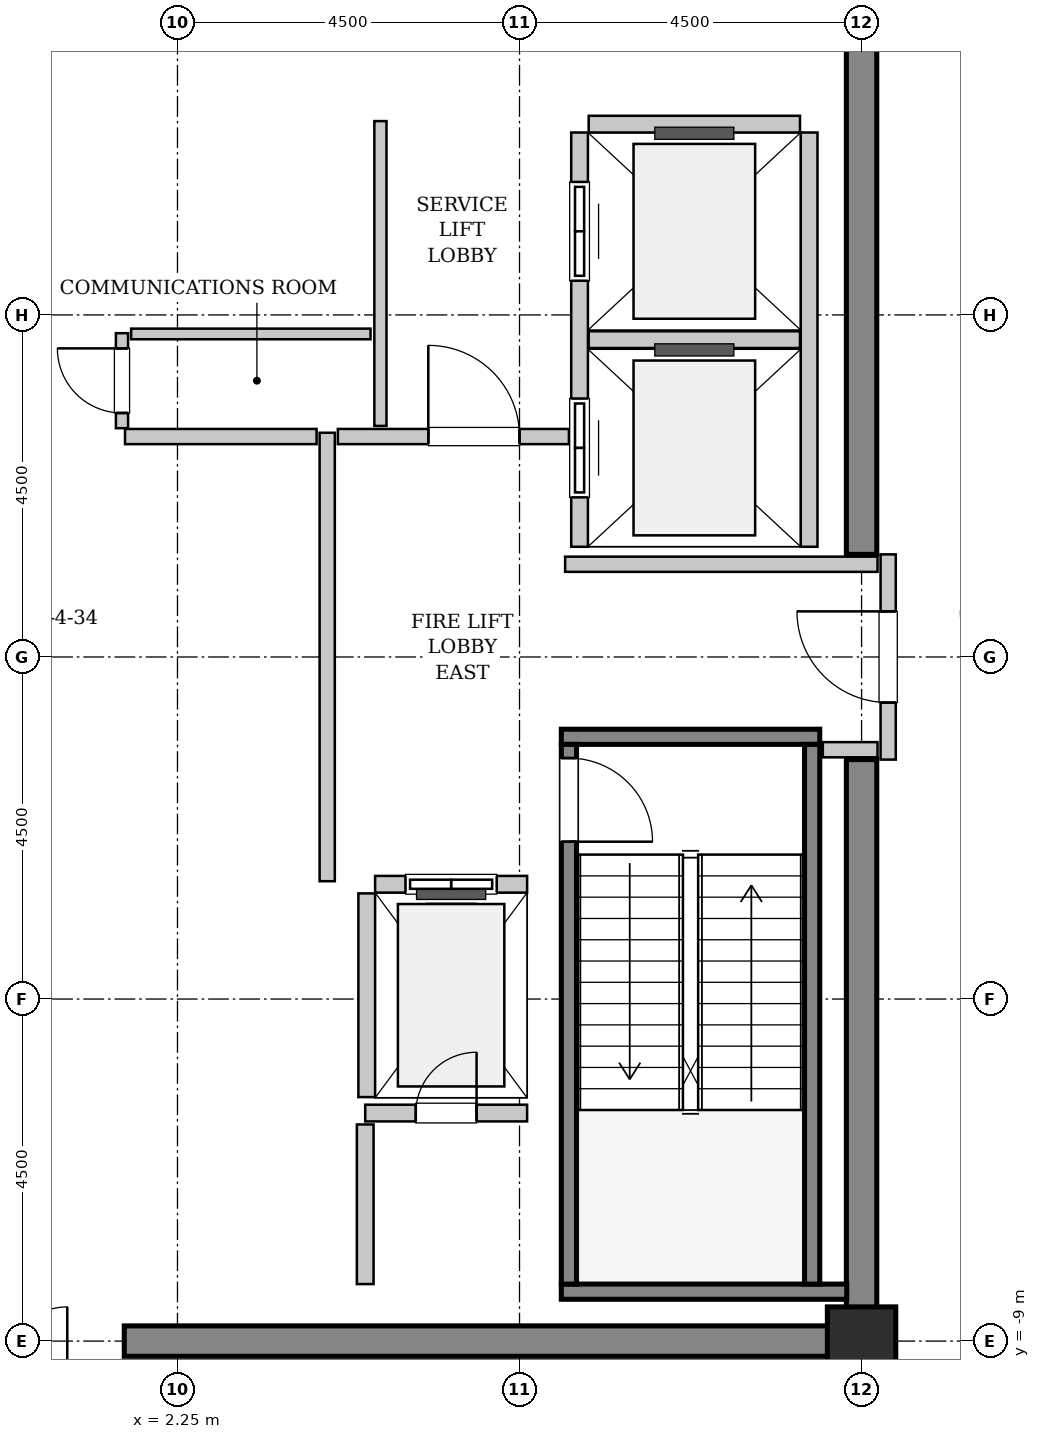
"""IFC4 building model, lengths in metres.
Left out: names, types, materials, properties, quantities, classifications, styles, units other than length and angle.
Written with IfcOpenShell. Run it as: python <this file> out.ifc"""

import sys

from ifc_helpers import new_model, si_unit, direction, frame, frame_2d, origin, origin_2d, place, context, subcontext, project, spatial, rectangle, extrude, source, transform, mapped, element, fill, save


model = new_model("IFC4")
c1 = context("Model", 3, precision=1e-05, world=origin(), true_north=direction((0.0, 1.0)))
c2 = subcontext(c1, "Body", "Model", "MODEL_VIEW")
j1 = project(units=[si_unit("LENGTHUNIT", "METRE"), si_unit("PLANEANGLEUNIT", "RADIAN")], contexts=[c1])
p1 = place(None, origin())
s1 = spatial("IfcSite", under=j1, at=p1, CompositionType="ELEMENT")
p2 = place(p1, origin())
s2 = spatial("IfcBuilding", under=s1, at=p2, CompositionType="ELEMENT")
p3 = place(p2, frame((0.0, 0.0, 363.0)))
s3 = spatial("IfcBuildingStorey", under=s2, at=p3, CompositionType="ELEMENT", Elevation=363.0)
m1 = source(origin(), c2, "Body", "SweptSolid", [
    extrude(rectangle(XDim=9.9, YDim=0.4, at=frame_2d((4.95, 0.0))), origin(), (0.0, 0.0, 1.0), 4.4),
])
p4 = place(p3, frame((1.55, -9.0, 0.0), z_axis=(0.0, 0.0, 1.0), x_axis=(1.0, 0.0, 0.0)))
e1 = element("IfcWall", 1, at=p4, inside=s3, PredefinedType="SHEAR", context=c2, shape_type="MappedRepresentation", body=[
    mapped(m1, transform((0.0, 0.0, 0.0), x_axis=(1.0, 0.0, 0.0), y_axis=(0.0, 1.0, 0.0), z_axis=(0.0, 0.0, 1.0), scale=1.0)),
])
m2 = source(origin(), c2, "Body", "SweptSolid", [
    extrude(rectangle(XDim=7.45, YDim=0.4, at=frame_2d((3.725, 0.0))), origin(), (0.0, 0.0, 1.0), 4.4),
])
for number, where, z_axis, x_axis in (
    (2, (11.25, -8.8, 0.0), (0.0, 0.0, 1.0), (0.0, 1.0, 0.0)),
    (3, (11.25, 1.35, 0.0), (0.0, 0.0, 1.0), (0.0, 1.0, 0.0)),
):
    element("IfcWall", number, at=place(p3, frame(where, z_axis=z_axis, x_axis=x_axis)), inside=s3, PredefinedType="SHEAR", context=c2, shape_type="MappedRepresentation", body=[
        mapped(m2, transform((0.0, 0.0, 0.0), x_axis=(1.0, 0.0, 0.0), y_axis=(0.0, 1.0, 0.0), z_axis=(0.0, 0.0, 1.0), scale=1.0)),
    ])
m3 = source(origin(), c2, "Body", "SweptSolid", [
    extrude(rectangle(XDim=0.9, YDim=0.9, at=origin_2d()), origin(), (0.0, 0.0, 1.0), 4.4),
])
p5 = place(p3, frame((11.25, -9.0, 0.0), z_axis=(0.0, 0.0, 1.0), x_axis=(1.0, 0.0, 0.0)))
e4 = element("IfcColumn", 4, at=p5, inside=s3, PredefinedType="COLUMN", context=c2, shape_type="MappedRepresentation", body=[
    mapped(m3, transform((0.0, 0.0, 0.0), x_axis=(1.0, 0.0, 0.0), y_axis=(0.0, 1.0, 0.0), z_axis=(0.0, 0.0, 1.0), scale=1.0)),
])
m4 = source(origin(), c2, "Body", "SweptSolid", [
    extrude(rectangle(XDim=3.4, YDim=0.2, at=frame_2d((1.7, 0.0))), origin(), (0.0, 0.0, 1.0), 4.4),
])
p6 = place(p3, frame((7.3, -1.05, 0.0), z_axis=(0.0, 0.0, 1.0), x_axis=(1.0, 0.0, 0.0)))
e5 = element("IfcWall", 5, at=p6, inside=s3, PredefinedType="SOLIDWALL", context=c2, shape_type="MappedRepresentation", body=[
    mapped(m4, transform((0.0, 0.0, 0.0), x_axis=(1.0, 0.0, 0.0), y_axis=(0.0, 1.0, 0.0), z_axis=(0.0, 0.0, 1.0), scale=1.0)),
])
m5 = source(origin(), c2, "Body", "SweptSolid", [
    extrude(rectangle(XDim=3.755, YDim=0.2, at=frame_2d((1.877, 0.0))), origin(), (0.0, 0.0, 1.0), 4.4),
])
p7 = place(p3, frame((7.3, -8.35, 0.0), z_axis=(0.0, 0.0, 1.0), x_axis=(1.0, 0.0, 0.0)))
e6 = element("IfcWall", 6, at=p7, inside=s3, PredefinedType="SOLIDWALL", context=c2, shape_type="MappedRepresentation", body=[
    mapped(m5, transform((0.0, 0.0, 0.0), x_axis=(1.0, 0.0, 0.0), y_axis=(0.0, 1.0, 0.0), z_axis=(0.0, 0.0, 1.0), scale=1.0)),
])
m6 = source(origin(), c2, "Body", "SweptSolid", [
    extrude(rectangle(XDim=7.1, YDim=0.2, at=frame_2d((3.55, 0.0))), origin(), (0.0, 0.0, 1.0), 4.4),
])
p8 = place(p3, frame((7.4, -1.15, 0.0), z_axis=(0.0, 0.0, 1.0), x_axis=(0.0, -1.0, 0.0)))
e7 = element("IfcWall", 7, at=p8, inside=s3, PredefinedType="SOLIDWALL", context=c2, shape_type="MappedRepresentation", body=[
    mapped(m6, transform((0.0, 0.0, 0.0), x_axis=(1.0, 0.0, 0.0), y_axis=(0.0, 1.0, 0.0), z_axis=(0.0, 0.0, 1.0), scale=1.0)),
])
p9 = place(p8, frame((0.18, 0.0, 0.0)))
e8 = element("IfcOpeningElement", 8, at=p9, cuts=e7, PredefinedType="OPENING", context=c2, shape_type="SweptSolid", body=[
    extrude(rectangle(XDim=1.1, YDim=2.15, at=frame_2d((0.55, 1.075))), frame((0.0, 0.11, 0.0), z_axis=(0.0, -1.0, 0.0), x_axis=(1.0, 0.0, 0.0)), (0.0, 0.0, 1.0), 0.22),
])
p10 = place(p3, frame((10.6, -1.15, 0.0), z_axis=(0.0, 0.0, 1.0), x_axis=(0.0, -1.0, 0.0)))
e9 = element("IfcWall", 9, at=p10, inside=s3, PredefinedType="SOLIDWALL", context=c2, shape_type="MappedRepresentation", body=[
    mapped(m6, transform((0.0, 0.0, 0.0), x_axis=(1.0, 0.0, 0.0), y_axis=(0.0, 1.0, 0.0), z_axis=(0.0, 0.0, 1.0), scale=1.0)),
])
m7 = source(origin(), c2, "Body", "SweptSolid", [
    extrude(rectangle(XDim=2.0, YDim=0.22, at=frame_2d((1.0, 0.0))), origin(), (0.0, 0.0, 1.0), 4.085),
])
p11 = place(p3, frame((6.85, -2.99, 0.0), z_axis=(0.0, 0.0, 1.0), x_axis=(-1.0, 0.0, 0.0)))
e10 = element("IfcWall", 10, at=p11, inside=s3, PredefinedType="SOLIDWALL", context=c2, shape_type="MappedRepresentation", body=[
    mapped(m7, transform((0.0, 0.0, 0.0), x_axis=(1.0, 0.0, 0.0), y_axis=(0.0, 1.0, 0.0), z_axis=(0.0, 0.0, 1.0), scale=1.0)),
])
p12 = place(p11, frame((0.4, 0.0, 0.0)))
e11 = element("IfcOpeningElement", 11, at=p12, cuts=e10, PredefinedType="OPENING", context=c2, shape_type="SweptSolid", body=[
    extrude(rectangle(XDim=1.2, YDim=2.2, at=frame_2d((0.6, 1.1))), frame((0.0, 0.12, 0.0), z_axis=(0.0, -1.0, 0.0), x_axis=(1.0, 0.0, 0.0)), (0.0, 0.0, 1.0), 0.24),
])
m8 = source(origin(), c2, "Body", "SweptSolid", [
    extrude(rectangle(XDim=2.68, YDim=0.22, at=frame_2d((1.34, 0.0))), origin(), (0.0, 0.0, 1.0), 4.085),
])
p13 = place(p3, frame((4.74, -3.11, 0.0), z_axis=(0.0, 0.0, 1.0), x_axis=(0.0, -1.0, 0.0)))
e12 = element("IfcWall", 12, at=p13, inside=s3, PredefinedType="SOLIDWALL", context=c2, shape_type="MappedRepresentation", body=[
    mapped(m8, transform((0.0, 0.0, 0.0), x_axis=(1.0, 0.0, 0.0), y_axis=(0.0, 1.0, 0.0), z_axis=(0.0, 0.0, 1.0), scale=1.0)),
])
m9 = source(origin(), c2, "Body", "SweptSolid", [
    extrude(rectangle(XDim=5.45, YDim=0.22, at=frame_2d((2.725, 0.0))), origin(), (0.0, 0.0, 1.0), 4.085),
])
p14 = place(p3, frame((7.54, 6.9, 0.0), z_axis=(0.0, 0.0, 1.0), x_axis=(0.0, -1.0, 0.0)))
e13 = element("IfcWall", 13, at=p14, inside=s3, PredefinedType="SOLIDWALL", context=c2, shape_type="MappedRepresentation", body=[
    mapped(m9, transform((0.0, 0.0, 0.0), x_axis=(1.0, 0.0, 0.0), y_axis=(0.0, 1.0, 0.0), z_axis=(0.0, 0.0, 1.0), scale=1.0)),
])
p15 = place(p14, frame((3.5, 0.0, 0.0)))
e14 = element("IfcOpeningElement", 14, at=p15, cuts=e13, PredefinedType="OPENING", context=c2, shape_type="SweptSolid", body=[
    extrude(rectangle(XDim=1.3, YDim=2.3, at=frame_2d((0.65, 1.15))), frame((0.0, 0.12, 0.0), z_axis=(0.0, -1.0, 0.0), x_axis=(1.0, 0.0, 0.0)), (0.0, 0.0, 1.0), 0.24),
])
p16 = place(p14, frame((0.65, 0.0, 0.0)))
e15 = element("IfcOpeningElement", 15, at=p16, cuts=e13, PredefinedType="OPENING", context=c2, shape_type="SweptSolid", body=[
    extrude(rectangle(XDim=1.3, YDim=2.3, at=frame_2d((0.65, 1.15))), frame((0.0, 0.12, 0.0), z_axis=(0.0, -1.0, 0.0), x_axis=(1.0, 0.0, 0.0)), (0.0, 0.0, 1.0), 0.24),
])
p17 = place(p3, frame((10.56, 1.45, 0.0), z_axis=(0.0, 0.0, 1.0), x_axis=(0.0, 1.0, 0.0)))
e16 = element("IfcWall", 16, at=p17, inside=s3, PredefinedType="SOLIDWALL", context=c2, shape_type="MappedRepresentation", body=[
    mapped(m9, transform((0.0, 0.0, 0.0), x_axis=(1.0, 0.0, 0.0), y_axis=(0.0, 1.0, 0.0), z_axis=(0.0, 0.0, 1.0), scale=1.0)),
])
m10 = source(origin(), c2, "Body", "SweptSolid", [
    extrude(rectangle(XDim=2.78, YDim=0.22, at=frame_2d((1.39, 0.0))), origin(), (0.0, 0.0, 1.0), 4.085),
])
for number, where, z_axis, x_axis in (
    (17, (7.66, 4.175, 0.0), (0.0, 0.0, 1.0), (1.0, 0.0, 0.0)),
    (18, (10.44, 7.01, 0.0), (0.0, 0.0, 1.0), (-1.0, 0.0, 0.0)),
):
    element("IfcWall", number, at=place(p3, frame(where, z_axis=z_axis, x_axis=x_axis)), inside=s3, PredefinedType="SOLIDWALL", context=c2, shape_type="MappedRepresentation", body=[
        mapped(m10, transform((0.0, 0.0, 0.0), x_axis=(1.0, 0.0, 0.0), y_axis=(0.0, 1.0, 0.0), z_axis=(0.0, 0.0, 1.0), scale=1.0)),
    ])
m11 = source(origin(), c2, "Body", "SweptSolid", [
    extrude(rectangle(XDim=2.13, YDim=0.22, at=frame_2d((1.065, 0.0))), origin(), (0.0, 0.0, 1.0), 4.085),
])
p18 = place(p3, frame((4.72, -6.0, 0.0), z_axis=(0.0, 0.0, 1.0), x_axis=(1.0, 0.0, 0.0)))
e19 = element("IfcWall", 19, at=p18, inside=s3, PredefinedType="SOLIDWALL", context=c2, shape_type="MappedRepresentation", body=[
    mapped(m11, transform((0.0, 0.0, 0.0), x_axis=(1.0, 0.0, 0.0), y_axis=(0.0, 1.0, 0.0), z_axis=(0.0, 0.0, 1.0), scale=1.0)),
])
p19 = place(p18, frame((0.665, 0.0, 0.0)))
e20 = element("IfcOpeningElement", 20, at=p19, cuts=e19, PredefinedType="OPENING", context=c2, shape_type="SweptSolid", body=[
    extrude(rectangle(XDim=0.8, YDim=2.0, at=frame_2d((0.4, 1.0))), frame((0.0, 0.12, 0.0), z_axis=(0.0, -1.0, 0.0), x_axis=(1.0, 0.0, 0.0)), (0.0, 0.0, 1.0), 0.24),
])
m12 = source(origin(), c2, "Body", "SweptSolid", [
    extrude(rectangle(XDim=2.1, YDim=0.22, at=frame_2d((1.05, 0.0))), origin(), (0.0, 0.0, 1.0), 4.085),
])
p20 = place(p3, frame((4.72, -8.25, 0.0), z_axis=(0.0, 0.0, 1.0), x_axis=(0.0, 1.0, 0.0)))
e21 = element("IfcWall", 21, at=p20, inside=s3, PredefinedType="SOLIDWALL", context=c2, shape_type="MappedRepresentation", body=[
    mapped(m12, transform((0.0, 0.0, 0.0), x_axis=(1.0, 0.0, 0.0), y_axis=(0.0, 1.0, 0.0), z_axis=(0.0, 0.0, 1.0), scale=1.0)),
])
m13 = source(origin(), c2, "Body", "SweptSolid", [
    extrude(rectangle(XDim=2.7, YDim=0.2, at=frame_2d((1.35, 0.0))), origin(), (0.0, 0.0, 1.0), 3.175),
])
p21 = place(p3, frame((11.6, -1.35, 0.0), z_axis=(0.0, 0.0, 1.0), x_axis=(0.0, 1.0, 0.0)))
e22 = element("IfcWall", 22, at=p21, inside=s3, PredefinedType="PARTITIONING", context=c2, shape_type="MappedRepresentation", body=[
    mapped(m13, transform((0.0, 0.0, 0.0), x_axis=(1.0, 0.0, 0.0), y_axis=(0.0, 1.0, 0.0), z_axis=(0.0, 0.0, 1.0), scale=1.0)),
])
p22 = place(p21, frame((0.75, 0.0, 0.0)))
e23 = element("IfcOpeningElement", 23, at=p22, cuts=e22, PredefinedType="OPENING", context=c2, shape_type="SweptSolid", body=[
    extrude(rectangle(XDim=1.2, YDim=2.15, at=frame_2d((0.6, 1.075))), frame((0.0, 0.11, 0.0), z_axis=(0.0, -1.0, 0.0), x_axis=(1.0, 0.0, 0.0)), (0.0, 0.0, 1.0), 0.22),
])
m14 = source(origin(), c2, "Body", "SweptSolid", [
    extrude(rectangle(XDim=5.9, YDim=0.2, at=frame_2d((2.95, 0.0))), origin(), (0.0, 0.0, 1.0), 4.085),
])
p23 = place(p3, frame((4.22, -2.95, 0.0), z_axis=(0.0, 0.0, 1.0), x_axis=(0.0, 1.0, 0.0)))
e24 = element("IfcWall", 24, at=p23, inside=s3, PredefinedType="PARTITIONING", context=c2, shape_type="MappedRepresentation", body=[
    mapped(m14, transform((0.0, 0.0, 0.0), x_axis=(1.0, 0.0, 0.0), y_axis=(0.0, 1.0, 0.0), z_axis=(0.0, 0.0, 1.0), scale=1.0)),
])
m15 = source(origin(), c2, "Body", "SweptSolid", [
    extrude(rectangle(XDim=2.52, YDim=0.2, at=frame_2d((1.26, 0.0))), origin(), (0.0, 0.0, 1.0), 4.085),
])
p24 = place(p3, frame((1.56, 2.9, 0.0), z_axis=(0.0, 0.0, 1.0), x_axis=(1.0, 0.0, 0.0)))
e25 = element("IfcWall", 25, at=p24, inside=s3, PredefinedType="PARTITIONING", context=c2, shape_type="MappedRepresentation", body=[
    mapped(m15, transform((0.0, 0.0, 0.0), x_axis=(1.0, 0.0, 0.0), y_axis=(0.0, 1.0, 0.0), z_axis=(0.0, 0.0, 1.0), scale=1.0)),
])
m16 = source(origin(), c2, "Body", "SweptSolid", [
    extrude(rectangle(XDim=3.04, YDim=0.2, at=frame_2d((1.52, 0.0))), origin(), (0.0, 0.0, 1.0), 4.085),
])
p25 = place(p3, frame((4.36, 2.9, 0.0), z_axis=(0.0, 0.0, 1.0), x_axis=(1.0, 0.0, 0.0)))
e26 = element("IfcWall", 26, at=p25, inside=s3, PredefinedType="PARTITIONING", context=c2, shape_type="MappedRepresentation", body=[
    mapped(m16, transform((0.0, 0.0, 0.0), x_axis=(1.0, 0.0, 0.0), y_axis=(0.0, 1.0, 0.0), z_axis=(0.0, 0.0, 1.0), scale=1.0)),
])
p26 = place(p25, frame((1.19, 0.0, 0.0)))
e27 = element("IfcOpeningElement", 27, at=p26, cuts=e26, PredefinedType="OPENING", context=c2, shape_type="SweptSolid", body=[
    extrude(rectangle(XDim=1.2, YDim=2.15, at=frame_2d((0.6, 1.075))), frame((0.0, 0.11, 0.0), z_axis=(0.0, -1.0, 0.0), x_axis=(1.0, 0.0, 0.0)), (0.0, 0.0, 1.0), 0.22),
])
m17 = source(origin(), c2, "Body", "SweptSolid", [
    extrude(rectangle(XDim=4.11, YDim=0.2, at=frame_2d((2.055, 0.0))), origin(), (0.0, 0.0, 1.0), 4.085),
])
p27 = place(p3, frame((7.35, 1.22, 0.0), z_axis=(0.0, 0.0, 1.0), x_axis=(1.0, 0.0, 0.0)))
e28 = element("IfcWall", 28, at=p27, inside=s3, PredefinedType="PARTITIONING", context=c2, shape_type="MappedRepresentation", body=[
    mapped(m17, transform((0.0, 0.0, 0.0), x_axis=(1.0, 0.0, 0.0), y_axis=(0.0, 1.0, 0.0), z_axis=(0.0, 0.0, 1.0), scale=1.0)),
])
m18 = source(origin(), c2, "Body", "SweptSolid", [
    extrude(rectangle(XDim=0.72, YDim=0.2, at=frame_2d((0.36, 0.0))), origin(), (0.0, 0.0, 1.0), 4.085),
])
p28 = place(p3, frame((10.74, -1.22, 0.0), z_axis=(0.0, 0.0, 1.0), x_axis=(1.0, 0.0, 0.0)))
e29 = element("IfcWall", 29, at=p28, inside=s3, PredefinedType="PARTITIONING", context=c2, shape_type="MappedRepresentation", body=[
    mapped(m18, transform((0.0, 0.0, 0.0), x_axis=(1.0, 0.0, 0.0), y_axis=(0.0, 1.0, 0.0), z_axis=(0.0, 0.0, 1.0), scale=1.0)),
])
m19 = source(origin(), c2, "Body", "SweptSolid", [
    extrude(rectangle(XDim=4.01, YDim=0.16, at=frame_2d((2.005, 0.0))), origin(), (0.0, 0.0, 1.0), 4.085),
])
p29 = place(p3, frame((4.92, 3.04, 0.0), z_axis=(0.0, 0.0, 1.0), x_axis=(0.0, 1.0, 0.0)))
e30 = element("IfcWall", 30, at=p29, inside=s3, PredefinedType="PARTITIONING", context=c2, shape_type="MappedRepresentation", body=[
    mapped(m19, transform((0.0, 0.0, 0.0), x_axis=(1.0, 0.0, 0.0), y_axis=(0.0, 1.0, 0.0), z_axis=(0.0, 0.0, 1.0), scale=1.0)),
])
m20 = source(origin(), c2, "Body", "SweptSolid", [
    extrude(rectangle(XDim=1.25, YDim=0.16, at=frame_2d((0.625, 0.0))), origin(), (0.0, 0.0, 1.0), 4.085),
])
p30 = place(p3, frame((1.52, 3.01, 0.0), z_axis=(0.0, 0.0, 1.0), x_axis=(0.0, 1.0, 0.0)))
e31 = element("IfcWall", 31, at=p30, inside=s3, PredefinedType="PARTITIONING", context=c2, shape_type="MappedRepresentation", body=[
    mapped(m20, transform((0.0, 0.0, 0.0), x_axis=(1.0, 0.0, 0.0), y_axis=(0.0, 1.0, 0.0), z_axis=(0.0, 0.0, 1.0), scale=1.0)),
])
p31 = place(p30, frame((0.2, 0.0, 0.0)))
e32 = element("IfcOpeningElement", 32, at=p31, cuts=e31, PredefinedType="OPENING", context=c2, shape_type="SweptSolid", body=[
    extrude(rectangle(XDim=0.85, YDim=2.1, at=frame_2d((0.425, 1.05))), frame((0.0, 0.09, 0.0), z_axis=(0.0, -1.0, 0.0), x_axis=(1.0, 0.0, 0.0)), (0.0, 0.0, 1.0), 0.18),
])
m21 = source(origin(), c2, "Body", "SweptSolid", [
    extrude(rectangle(XDim=3.15, YDim=0.14, at=frame_2d((1.575, 0.0))), origin(), (0.0, 0.0, 1.0), 4.085),
])
p32 = place(p3, frame((1.64, 4.25, 0.0), z_axis=(0.0, 0.0, 1.0), x_axis=(1.0, 0.0, 0.0)))
e33 = element("IfcWall", 33, at=p32, inside=s3, PredefinedType="PARTITIONING", context=c2, shape_type="MappedRepresentation", body=[
    mapped(m21, transform((0.0, 0.0, 0.0), x_axis=(1.0, 0.0, 0.0), y_axis=(0.0, 1.0, 0.0), z_axis=(0.0, 0.0, 1.0), scale=1.0)),
])
m22 = source(origin(), c2, "Body", "SweptSolid", [
    extrude(rectangle(XDim=1.1, YDim=2.15, at=frame_2d((0.55, 1.075))), frame((0.0, 0.025, 0.0), z_axis=(0.0, -1.0, 0.0), x_axis=(1.0, 0.0, 0.0)), (0.0, 0.0, 1.0), 0.05),
])
p33 = place(p9, origin())
e34 = element("IfcDoor", 34, at=p33, inside=s3, OperationType="SINGLE_SWING_RIGHT", PredefinedType="DOOR", context=c2, shape_type="MappedRepresentation", body=[
    mapped(m22, transform((0.0, 0.0, 0.0), x_axis=(1.0, 0.0, 0.0), y_axis=(0.0, 1.0, 0.0), z_axis=(0.0, 0.0, 1.0), scale=1.0)),
])
fill(e8, e34)
m23 = source(origin(), c2, "Body", "SweptSolid", [
    extrude(rectangle(XDim=1.2, YDim=2.2, at=frame_2d((0.6, 1.1))), frame((0.0, 0.025, 0.0), z_axis=(0.0, -1.0, 0.0), x_axis=(1.0, 0.0, 0.0)), (0.0, 0.0, 1.0), 0.05),
])
p34 = place(p12, origin())
e35 = element("IfcDoor", 35, at=p34, inside=s3, OperationType="SLIDING_TO_LEFT", PredefinedType="DOOR", context=c2, shape_type="MappedRepresentation", body=[
    mapped(m23, transform((0.0, 0.0, 0.0), x_axis=(1.0, 0.0, 0.0), y_axis=(0.0, 1.0, 0.0), z_axis=(0.0, 0.0, 1.0), scale=1.0)),
])
fill(e11, e35)
m24 = source(origin(), c2, "Body", "SweptSolid", [
    extrude(rectangle(XDim=1.3, YDim=2.3, at=frame_2d((0.65, 1.15))), frame((0.0, 0.025, 0.0), z_axis=(0.0, -1.0, 0.0), x_axis=(1.0, 0.0, 0.0)), (0.0, 0.0, 1.0), 0.05),
])
p35 = place(p15, origin())
e36 = element("IfcDoor", 36, at=p35, inside=s3, OperationType="SLIDING_TO_RIGHT", PredefinedType="DOOR", context=c2, shape_type="MappedRepresentation", body=[
    mapped(m24, transform((0.0, 0.0, 0.0), x_axis=(1.0, 0.0, 0.0), y_axis=(0.0, 1.0, 0.0), z_axis=(0.0, 0.0, 1.0), scale=1.0)),
])
fill(e14, e36)
p36 = place(p16, origin())
e37 = element("IfcDoor", 37, at=p36, inside=s3, OperationType="SLIDING_TO_RIGHT", PredefinedType="DOOR", context=c2, shape_type="MappedRepresentation", body=[
    mapped(m24, transform((0.0, 0.0, 0.0), x_axis=(1.0, 0.0, 0.0), y_axis=(0.0, 1.0, 0.0), z_axis=(0.0, 0.0, 1.0), scale=1.0)),
])
fill(e15, e37)
m25 = source(origin(), c2, "Body", "SweptSolid", [
    extrude(rectangle(XDim=0.8, YDim=2.0, at=frame_2d((0.4, 1.0))), frame((0.0, 0.025, 0.0), z_axis=(0.0, -1.0, 0.0), x_axis=(1.0, 0.0, 0.0)), (0.0, 0.0, 1.0), 0.05),
])
p37 = place(p19, origin())
e38 = element("IfcDoor", 38, at=p37, inside=s3, OperationType="SINGLE_SWING_RIGHT", PredefinedType="TRAPDOOR", context=c2, shape_type="MappedRepresentation", body=[
    mapped(m25, transform((0.0, 0.0, 0.0), x_axis=(1.0, 0.0, 0.0), y_axis=(0.0, 1.0, 0.0), z_axis=(0.0, 0.0, 1.0), scale=1.0)),
])
fill(e20, e38)
m26 = source(origin(), c2, "Body", "SweptSolid", [
    extrude(rectangle(XDim=1.2, YDim=2.15, at=frame_2d((0.6, 1.075))), frame((0.0, 0.025, 0.0), z_axis=(0.0, -1.0, 0.0), x_axis=(1.0, 0.0, 0.0)), (0.0, 0.0, 1.0), 0.05),
])
p38 = place(p22, origin())
e39 = element("IfcDoor", 39, at=p38, inside=s3, OperationType="SINGLE_SWING_RIGHT", PredefinedType="DOOR", context=c2, shape_type="MappedRepresentation", body=[
    mapped(m26, transform((0.0, 0.0, 0.0), x_axis=(1.0, 0.0, 0.0), y_axis=(0.0, 1.0, 0.0), z_axis=(0.0, 0.0, 1.0), scale=1.0)),
])
fill(e23, e39)
p39 = place(p26, origin())
e40 = element("IfcDoor", 40, at=p39, inside=s3, OperationType="SINGLE_SWING_LEFT", PredefinedType="DOOR", context=c2, shape_type="MappedRepresentation", body=[
    mapped(m26, transform((0.0, 0.0, 0.0), x_axis=(1.0, 0.0, 0.0), y_axis=(0.0, 1.0, 0.0), z_axis=(0.0, 0.0, 1.0), scale=1.0)),
])
fill(e27, e40)
m27 = source(origin(), c2, "Body", "SweptSolid", [
    extrude(rectangle(XDim=0.85, YDim=2.1, at=frame_2d((0.425, 1.05))), frame((0.0, 0.025, 0.0), z_axis=(0.0, -1.0, 0.0), x_axis=(1.0, 0.0, 0.0)), (0.0, 0.0, 1.0), 0.05),
])
p40 = place(p31, origin())
e41 = element("IfcDoor", 41, at=p40, inside=s3, OperationType="SINGLE_SWING_RIGHT", PredefinedType="DOOR", context=c2, shape_type="MappedRepresentation", body=[
    mapped(m27, transform((0.0, 0.0, 0.0), x_axis=(1.0, 0.0, 0.0), y_axis=(0.0, 1.0, 0.0), z_axis=(0.0, 0.0, 1.0), scale=1.0)),
])
fill(e32, e41)
save(model, sys.argv[1])
